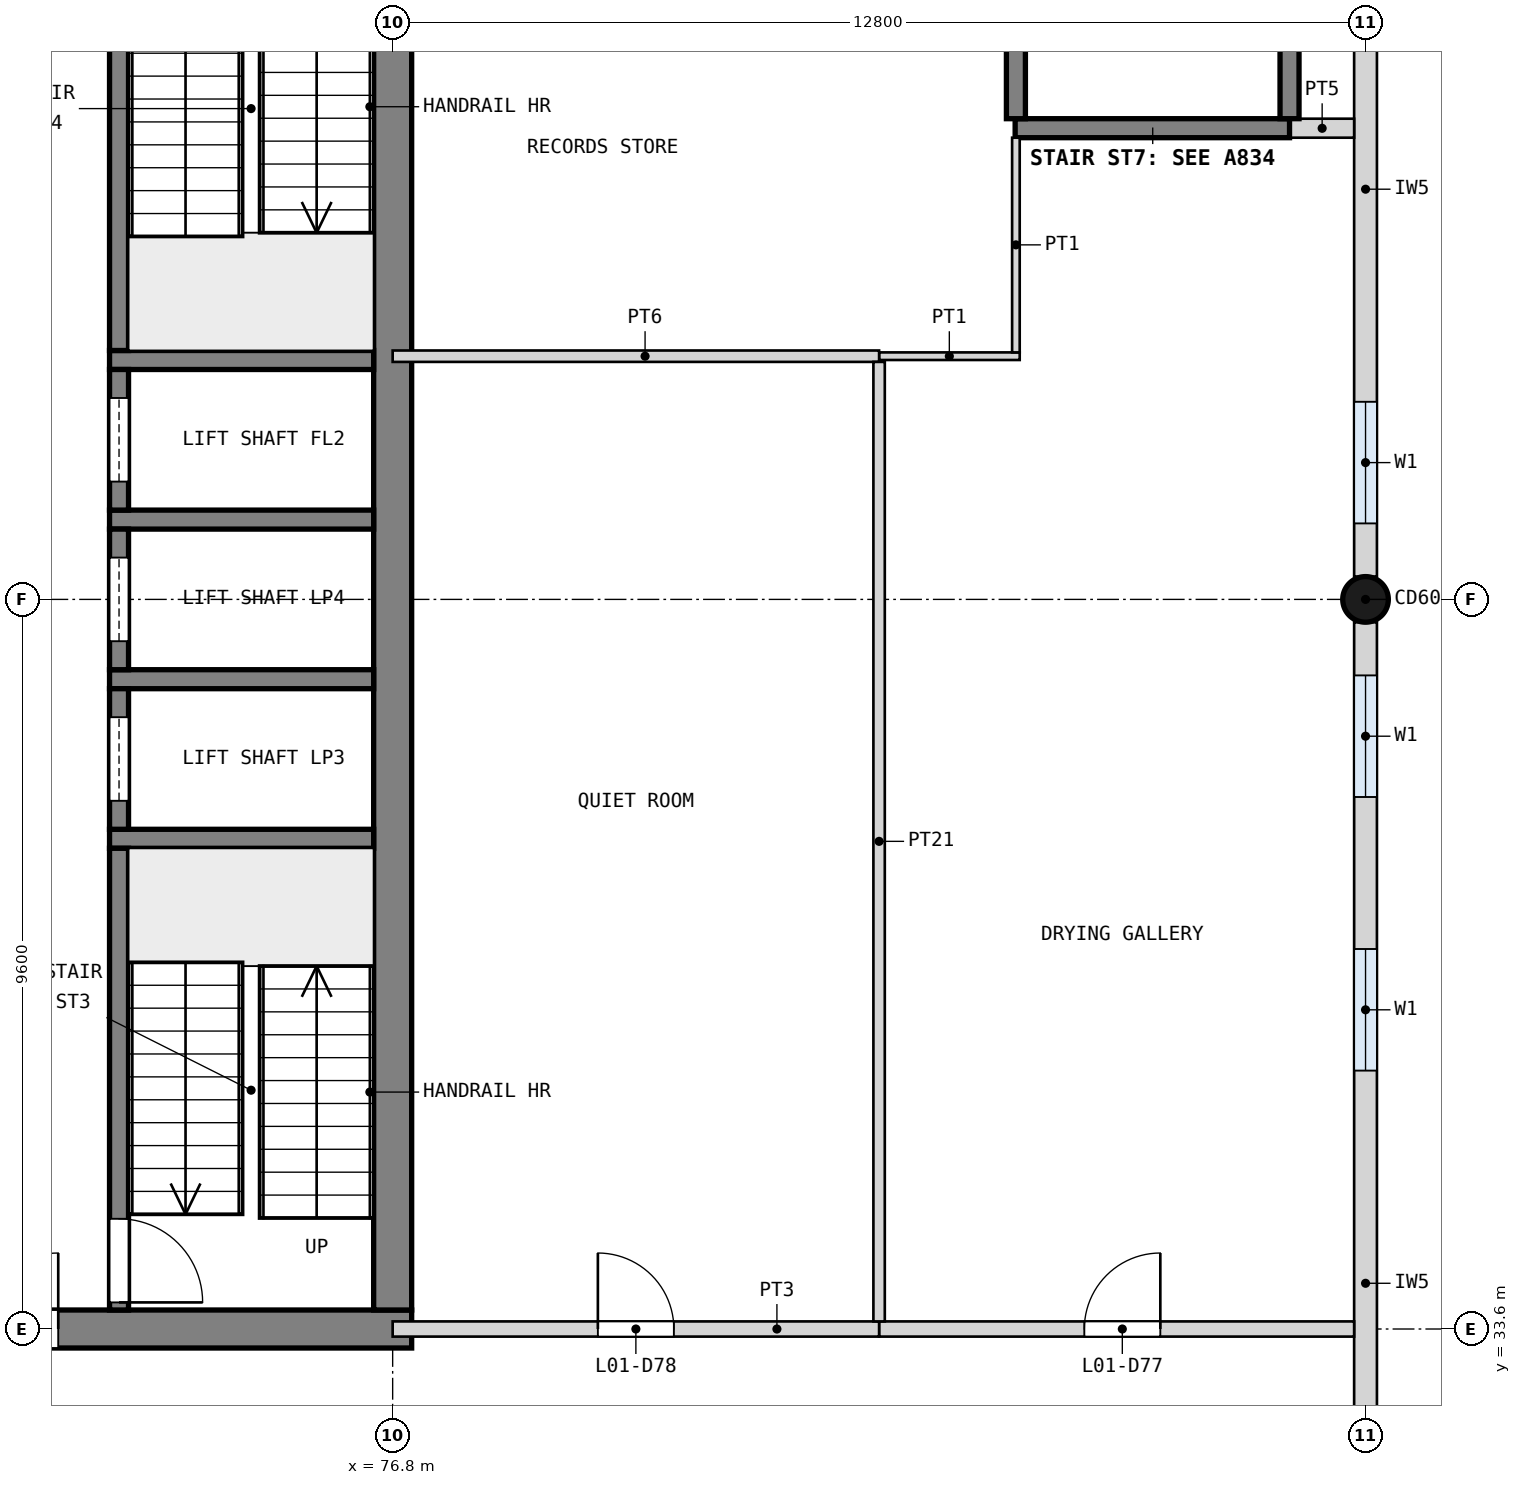
"""IFC4 building model, lengths in metres.
Left out: names, types, materials, properties, quantities, classifications, styles, units other than length and angle.
Written with IfcOpenShell. Run it as: python <this file> out.ifc"""

import sys

from ifc_helpers import new_model, si_unit, direction, frame, frame_2d, origin, origin_2d, place, context, subcontext, project, spatial, rectangle, circle, extrude, element, fill, save


model = new_model("IFC4")
c1 = context("Model", 3, precision=1e-05, world=origin(), true_north=direction((0.0, 1.0)))
c2 = subcontext(c1, "Body", "Model", "MODEL_VIEW")
j1 = project(units=[si_unit("LENGTHUNIT", "METRE"), si_unit("PLANEANGLEUNIT", "RADIAN")], contexts=[c1])
p1 = place(None, origin())
s1 = spatial("IfcSite", under=j1, at=p1, CompositionType="ELEMENT")
p2 = place(p1, origin())
s2 = spatial("IfcBuilding", under=s1, at=p2, CompositionType="ELEMENT")
p3 = place(p2, frame((0.0, 0.0, 4.2)))
s3 = spatial("IfcBuildingStorey", under=s2, at=p3, CompositionType="ELEMENT", Elevation=4.2)
p4 = place(p3, frame((63.75, 33.6, 0.0), z_axis=(0.0, 0.0, 1.0), x_axis=(1.0, 0.0, 0.0)))
e1 = element("IfcWall", 1, at=p4, inside=s3, PredefinedType="SHEAR", context=c2, shape_type="SweptSolid", body=[
    extrude(rectangle(XDim=13.3, YDim=0.5, at=frame_2d((6.65, 0.0))), origin(), (0.0, 0.0, 1.0), 4.2),
])
p5 = place(p4, frame((6.65, 0.0, 0.0)))
e2 = element("IfcOpeningElement", 2, at=p5, cuts=e1, PredefinedType="OPENING", context=c2, shape_type="SweptSolid", body=[
    extrude(rectangle(XDim=2.0, YDim=2.1, at=frame_2d((1.0, 1.05))), frame((0.0, 0.26, 0.0), z_axis=(0.0, -1.0, 0.0), x_axis=(1.0, 0.0, 0.0)), (0.0, 0.0, 1.0), 0.52),
])
p6 = place(p3, frame((76.8, 33.85, 0.0), z_axis=(0.0, 0.0, 1.0), x_axis=(0.0, 1.0, 0.0)))
e3 = element("IfcWall", 3, at=p6, inside=s3, PredefinedType="SHEAR", context=c2, shape_type="SweptSolid", body=[
    extrude(rectangle(XDim=18.7, YDim=0.5, at=frame_2d((9.35, 0.0))), origin(), (0.0, 0.0, 1.0), 4.2),
])
p7 = place(p3, frame((89.6, 43.2, 0.0), z_axis=(0.0, 0.0, 1.0), x_axis=(1.0, 0.0, 0.0)))
e4 = element("IfcColumn", 4, at=p7, inside=s3, PredefinedType="COLUMN", context=c2, shape_type="SweptSolid", body=[
    extrude(circle(Radius=0.3, at=origin_2d()), origin(), (0.0, 0.0, 1.0), 4.2),
])
p8 = place(p3, frame((89.6, 29.1, 0.0), z_axis=(0.0, 0.0, 1.0), x_axis=(0.0, 1.0, 0.0)))
e5 = element("IfcWall", 5, at=p8, inside=s3, PredefinedType="SOLIDWALL", context=c2, shape_type="SweptSolid", body=[
    extrude(rectangle(XDim=13.8, YDim=0.3, at=frame_2d((6.9, 0.0))), origin(), (0.0, 0.0, 1.0), 2.9),
])
p9 = place(p8, frame((0.7, 0.0, 1.0)))
e6 = element("IfcOpeningElement", 6, at=p9, cuts=e5, PredefinedType="OPENING", context=c2, shape_type="SweptSolid", body=[
    extrude(rectangle(XDim=1.6, YDim=1.8, at=frame_2d((0.8, 0.9))), frame((0.0, 0.16, 0.0), z_axis=(0.0, -1.0, 0.0), x_axis=(1.0, 0.0, 0.0)), (0.0, 0.0, 1.0), 0.32),
])
p10 = place(p8, frame((7.9, 0.0, 1.0)))
e7 = element("IfcOpeningElement", 7, at=p10, cuts=e5, PredefinedType="OPENING", context=c2, shape_type="SweptSolid", body=[
    extrude(rectangle(XDim=1.6, YDim=1.8, at=frame_2d((0.8, 0.9))), frame((0.0, 0.16, 0.0), z_axis=(0.0, -1.0, 0.0), x_axis=(1.0, 0.0, 0.0)), (0.0, 0.0, 1.0), 0.32),
])
p11 = place(p8, frame((11.5, 0.0, 1.0)))
e8 = element("IfcOpeningElement", 8, at=p11, cuts=e5, PredefinedType="OPENING", context=c2, shape_type="SweptSolid", body=[
    extrude(rectangle(XDim=1.6, YDim=1.8, at=frame_2d((0.8, 0.9))), frame((0.0, 0.16, 0.0), z_axis=(0.0, -1.0, 0.0), x_axis=(1.0, 0.0, 0.0)), (0.0, 0.0, 1.0), 0.32),
])
p12 = place(p3, frame((89.6, 43.5, 0.0), z_axis=(0.0, 0.0, 1.0), x_axis=(0.0, 1.0, 0.0)))
e9 = element("IfcWall", 9, at=p12, inside=s3, PredefinedType="SOLIDWALL", context=c2, shape_type="SweptSolid", body=[
    extrude(rectangle(XDim=13.8, YDim=0.3, at=frame_2d((6.9, 0.0))), origin(), (0.0, 0.0, 1.0), 2.9),
])
p13 = place(p12, frame((0.7, 0.0, 1.0)))
e10 = element("IfcOpeningElement", 10, at=p13, cuts=e9, PredefinedType="OPENING", context=c2, shape_type="SweptSolid", body=[
    extrude(rectangle(XDim=1.6, YDim=1.8, at=frame_2d((0.8, 0.9))), frame((0.0, 0.16, 0.0), z_axis=(0.0, -1.0, 0.0), x_axis=(1.0, 0.0, 0.0)), (0.0, 0.0, 1.0), 0.32),
])
p14 = place(p12, frame((7.9, 0.0, 1.0)))
e11 = element("IfcOpeningElement", 11, at=p14, cuts=e9, PredefinedType="OPENING", context=c2, shape_type="SweptSolid", body=[
    extrude(rectangle(XDim=1.6, YDim=1.8, at=frame_2d((0.8, 0.9))), frame((0.0, 0.16, 0.0), z_axis=(0.0, -1.0, 0.0), x_axis=(1.0, 0.0, 0.0)), (0.0, 0.0, 1.0), 0.32),
])
p15 = place(p12, frame((11.5, 0.0, 1.0)))
e12 = element("IfcOpeningElement", 12, at=p15, cuts=e9, PredefinedType="OPENING", context=c2, shape_type="SweptSolid", body=[
    extrude(rectangle(XDim=1.6, YDim=1.8, at=frame_2d((0.8, 0.9))), frame((0.0, 0.16, 0.0), z_axis=(0.0, -1.0, 0.0), x_axis=(1.0, 0.0, 0.0)), (0.0, 0.0, 1.0), 0.32),
])
for number, where, z_axis, x_axis in (
    (13, (76.55, 40.05, 0.0), (0.0, 0.0, 1.0), (-1.0, 0.0, 0.0)),
    (14, (76.55, 42.15, 0.0), (0.0, 0.0, 1.0), (-1.0, 0.0, 0.0)),
    (15, (76.55, 44.25, 0.0), (0.0, 0.0, 1.0), (-1.0, 0.0, 0.0)),
    (16, (76.55, 46.35, 0.0), (0.0, 0.0, 1.0), (-1.0, 0.0, 0.0)),
):
    element("IfcWall", number, at=place(p3, frame(where, z_axis=z_axis, x_axis=x_axis)), inside=s3, PredefinedType="SOLIDWALL", context=c2, shape_type="SweptSolid", body=[
        extrude(rectangle(XDim=3.475, YDim=0.25, at=frame_2d((1.738, 0.0))), origin(), (0.0, 0.0, 1.0), 3.9),
    ])
p16 = place(p3, frame((73.2, 33.85, 0.0), z_axis=(0.0, 0.0, 1.0), x_axis=(0.0, 1.0, 0.0)))
e17 = element("IfcWall", 17, at=p16, inside=s3, PredefinedType="SOLIDWALL", context=c2, shape_type="SweptSolid", body=[
    extrude(rectangle(XDim=6.075, YDim=0.25, at=frame_2d((3.038, 0.0))), origin(), (0.0, 0.0, 1.0), 3.9),
])
p17 = place(p16, frame((0.1, 0.0, 0.0)))
e18 = element("IfcOpeningElement", 18, at=p17, cuts=e17, PredefinedType="OPENING", context=c2, shape_type="SweptSolid", body=[
    extrude(rectangle(XDim=1.1, YDim=2.1, at=frame_2d((0.55, 1.05))), frame((0.0, 0.135, 0.0), z_axis=(0.0, -1.0, 0.0), x_axis=(1.0, 0.0, 0.0)), (0.0, 0.0, 1.0), 0.27),
])
p18 = place(p3, frame((73.2, 40.175, 0.0), z_axis=(0.0, 0.0, 1.0), x_axis=(0.0, 1.0, 0.0)))
e19 = element("IfcWall", 19, at=p18, inside=s3, PredefinedType="SOLIDWALL", context=c2, shape_type="SweptSolid", body=[
    extrude(rectangle(XDim=1.85, YDim=0.25, at=frame_2d((0.925, 0.0))), origin(), (0.0, 0.0, 1.0), 3.9),
])
p19 = place(p18, frame((0.375, 0.0, 0.0)))
e20 = element("IfcOpeningElement", 20, at=p19, cuts=e19, PredefinedType="OPENING", context=c2, shape_type="SweptSolid", body=[
    extrude(rectangle(XDim=1.1, YDim=2.1, at=frame_2d((0.55, 1.05))), frame((0.0, 0.135, 0.0), z_axis=(0.0, -1.0, 0.0), x_axis=(1.0, 0.0, 0.0)), (0.0, 0.0, 1.0), 0.27),
])
p20 = place(p3, frame((73.2, 42.275, 0.0), z_axis=(0.0, 0.0, 1.0), x_axis=(0.0, 1.0, 0.0)))
e21 = element("IfcWall", 21, at=p20, inside=s3, PredefinedType="SOLIDWALL", context=c2, shape_type="SweptSolid", body=[
    extrude(rectangle(XDim=1.85, YDim=0.25, at=frame_2d((0.925, 0.0))), origin(), (0.0, 0.0, 1.0), 3.9),
])
p21 = place(p20, frame((0.375, 0.0, 0.0)))
e22 = element("IfcOpeningElement", 22, at=p21, cuts=e21, PredefinedType="OPENING", context=c2, shape_type="SweptSolid", body=[
    extrude(rectangle(XDim=1.1, YDim=2.1, at=frame_2d((0.55, 1.05))), frame((0.0, 0.135, 0.0), z_axis=(0.0, -1.0, 0.0), x_axis=(1.0, 0.0, 0.0)), (0.0, 0.0, 1.0), 0.27),
])
p22 = place(p3, frame((73.2, 44.375, 0.0), z_axis=(0.0, 0.0, 1.0), x_axis=(0.0, 1.0, 0.0)))
e23 = element("IfcWall", 23, at=p22, inside=s3, PredefinedType="SOLIDWALL", context=c2, shape_type="SweptSolid", body=[
    extrude(rectangle(XDim=1.85, YDim=0.25, at=frame_2d((0.925, 0.0))), origin(), (0.0, 0.0, 1.0), 3.9),
])
p23 = place(p22, frame((0.375, 0.0, 0.0)))
e24 = element("IfcOpeningElement", 24, at=p23, cuts=e23, PredefinedType="OPENING", context=c2, shape_type="SweptSolid", body=[
    extrude(rectangle(XDim=1.1, YDim=2.1, at=frame_2d((0.55, 1.05))), frame((0.0, 0.135, 0.0), z_axis=(0.0, -1.0, 0.0), x_axis=(1.0, 0.0, 0.0)), (0.0, 0.0, 1.0), 0.27),
])
p24 = place(p3, frame((73.2, 46.475, 0.0), z_axis=(0.0, 0.0, 1.0), x_axis=(0.0, 1.0, 0.0)))
e25 = element("IfcWall", 25, at=p24, inside=s3, PredefinedType="SOLIDWALL", context=c2, shape_type="SweptSolid", body=[
    extrude(rectangle(XDim=6.075, YDim=0.25, at=frame_2d((3.038, 0.0))), origin(), (0.0, 0.0, 1.0), 3.9),
])
p25 = place(p24, frame((4.875, 0.0, 0.0)))
e26 = element("IfcOpeningElement", 26, at=p25, cuts=e25, PredefinedType="OPENING", context=c2, shape_type="SweptSolid", body=[
    extrude(rectangle(XDim=1.1, YDim=2.1, at=frame_2d((0.55, 1.05))), frame((0.0, 0.135, 0.0), z_axis=(0.0, -1.0, 0.0), x_axis=(1.0, 0.0, 0.0)), (0.0, 0.0, 1.0), 0.27),
])
p26 = place(p3, frame((89.45, 33.6, 0.0), z_axis=(0.0, 0.0, 1.0), x_axis=(-1.0, 0.0, 0.0)))
e27 = element("IfcWall", 27, at=p26, inside=s3, PredefinedType="PARTITIONING", context=c2, shape_type="SweptSolid", body=[
    extrude(rectangle(XDim=6.25, YDim=0.2, at=frame_2d((3.125, 0.0))), origin(), (0.0, 0.0, 1.0), 3.9),
])
p27 = place(p26, frame((2.55, 0.0, 0.0)))
e28 = element("IfcOpeningElement", 28, at=p27, cuts=e27, PredefinedType="OPENING", context=c2, shape_type="SweptSolid", body=[
    extrude(rectangle(XDim=1.0, YDim=2.1, at=frame_2d((0.5, 1.05))), frame((0.0, 0.11, 0.0), z_axis=(0.0, -1.0, 0.0), x_axis=(1.0, 0.0, 0.0)), (0.0, 0.0, 1.0), 0.22),
])
p28 = place(p3, frame((83.2, 33.6, 0.0), z_axis=(0.0, 0.0, 1.0), x_axis=(-1.0, 0.0, 0.0)))
e29 = element("IfcWall", 29, at=p28, inside=s3, PredefinedType="PARTITIONING", context=c2, shape_type="SweptSolid", body=[
    extrude(rectangle(XDim=6.4, YDim=0.2, at=frame_2d((3.2, 0.0))), origin(), (0.0, 0.0, 1.0), 3.9),
])
p29 = place(p28, frame((2.7, 0.0, 0.0)))
e30 = element("IfcOpeningElement", 30, at=p29, cuts=e29, PredefinedType="OPENING", context=c2, shape_type="SweptSolid", body=[
    extrude(rectangle(XDim=1.0, YDim=2.1, at=frame_2d((0.5, 1.05))), frame((0.0, 0.11, 0.0), z_axis=(0.0, -1.0, 0.0), x_axis=(1.0, 0.0, 0.0)), (0.0, 0.0, 1.0), 0.22),
])
p30 = place(p3, frame((85.05, 46.4, 0.0), z_axis=(0.0, 0.0, 1.0), x_axis=(-1.0, 0.0, 0.0)))
e31 = element("IfcWall", 31, at=p30, inside=s3, PredefinedType="PARTITIONING", context=c2, shape_type="SweptSolid", body=[
    extrude(rectangle(XDim=1.85, YDim=0.1, at=frame_2d((0.925, 0.0))), origin(), (0.0, 0.0, 1.0), 3.9),
])
p31 = place(p3, frame((83.2, 46.4, 0.0), z_axis=(0.0, 0.0, 1.0), x_axis=(-1.0, 0.0, 0.0)))
e32 = element("IfcWall", 32, at=p31, inside=s3, PredefinedType="PARTITIONING", context=c2, shape_type="SweptSolid", body=[
    extrude(rectangle(XDim=6.4, YDim=0.15, at=frame_2d((3.2, 0.0))), origin(), (0.0, 0.0, 1.0), 3.9),
])
p32 = place(p3, frame((89.45, 49.4, 0.0), z_axis=(0.0, 0.0, 1.0), x_axis=(-1.0, 0.0, 0.0)))
e33 = element("IfcWall", 33, at=p32, inside=s3, PredefinedType="PARTITIONING", context=c2, shape_type="SweptSolid", body=[
    extrude(rectangle(XDim=0.85, YDim=0.25, at=frame_2d((0.425, 0.0))), origin(), (0.0, 0.0, 1.0), 3.9),
])
p33 = place(p3, frame((88.6, 49.4, 0.0), z_axis=(0.0, 0.0, 1.0), x_axis=(-1.0, 0.0, 0.0)))
e34 = element("IfcWall", 34, at=p33, inside=s3, PredefinedType="SHEAR", context=c2, shape_type="SweptSolid", body=[
    extrude(rectangle(XDim=3.61, YDim=0.25, at=frame_2d((1.805, 0.0))), origin(), (0.0, 0.0, 1.0), 3.9),
])
p34 = place(p3, frame((88.6, 49.525, 0.0), z_axis=(0.0, 0.0, 1.0), x_axis=(0.0, 1.0, 0.0)))
e35 = element("IfcWall", 35, at=p34, inside=s3, PredefinedType="SHEAR", context=c2, shape_type="SweptSolid", body=[
    extrude(rectangle(XDim=5.75, YDim=0.25, at=frame_2d((2.875, 0.0))), origin(), (0.0, 0.0, 1.0), 3.9),
])
p35 = place(p3, frame((85.0, 46.45, 0.0), z_axis=(0.0, 0.0, 1.0), x_axis=(0.0, 1.0, 0.0)))
e36 = element("IfcWall", 36, at=p35, inside=s3, PredefinedType="PARTITIONING", context=c2, shape_type="SweptSolid", body=[
    extrude(rectangle(XDim=2.825, YDim=0.1, at=frame_2d((1.413, 0.0))), origin(), (0.0, 0.0, 1.0), 3.9),
])
p36 = place(p3, frame((85.0, 49.525, 0.0), z_axis=(0.0, 0.0, 1.0), x_axis=(0.0, 1.0, 0.0)))
e37 = element("IfcWall", 37, at=p36, inside=s3, PredefinedType="SHEAR", context=c2, shape_type="SweptSolid", body=[
    extrude(rectangle(XDim=3.175, YDim=0.25, at=frame_2d((1.587, 0.0))), origin(), (0.0, 0.0, 1.0), 3.9),
])
p37 = place(p3, frame((83.2, 33.7, 0.0), z_axis=(0.0, 0.0, 1.0), x_axis=(0.0, 1.0, 0.0)))
e38 = element("IfcWall", 38, at=p37, inside=s3, PredefinedType="PARTITIONING", context=c2, shape_type="SweptSolid", body=[
    extrude(rectangle(XDim=12.625, YDim=0.15, at=frame_2d((6.312, 0.0))), origin(), (0.0, 0.0, 1.0), 2.9),
])
p38 = place(p17, frame((1.1, 0.0, 0.0), z_axis=(0.0, 0.0, 1.0), x_axis=(-1.0, 0.0, 0.0)))
e39 = element("IfcDoor", 39, at=p38, inside=s3, OperationType="SINGLE_SWING_RIGHT", PredefinedType="DOOR", context=c2, shape_type="SweptSolid", body=[
    extrude(rectangle(XDim=1.1, YDim=2.1, at=frame_2d((0.55, 1.05))), frame((0.0, 0.025, 0.0), z_axis=(0.0, -1.0, 0.0), x_axis=(1.0, 0.0, 0.0)), (0.0, 0.0, 1.0), 0.05),
])
fill(e18, e39)
p39 = place(p19, origin())
e40 = element("IfcDoor", 40, at=p39, inside=s3, OperationType="SLIDING_TO_LEFT", PredefinedType="DOOR", context=c2, shape_type="SweptSolid", body=[
    extrude(rectangle(XDim=1.1, YDim=2.1, at=frame_2d((0.55, 1.05))), frame((0.0, 0.025, 0.0), z_axis=(0.0, -1.0, 0.0), x_axis=(1.0, 0.0, 0.0)), (0.0, 0.0, 1.0), 0.05),
])
fill(e20, e40)
p40 = place(p21, origin())
e41 = element("IfcDoor", 41, at=p40, inside=s3, OperationType="SLIDING_TO_LEFT", PredefinedType="DOOR", context=c2, shape_type="SweptSolid", body=[
    extrude(rectangle(XDim=1.1, YDim=2.1, at=frame_2d((0.55, 1.05))), frame((0.0, 0.025, 0.0), z_axis=(0.0, -1.0, 0.0), x_axis=(1.0, 0.0, 0.0)), (0.0, 0.0, 1.0), 0.05),
])
fill(e22, e41)
p41 = place(p23, origin())
e42 = element("IfcDoor", 42, at=p41, inside=s3, OperationType="SLIDING_TO_LEFT", PredefinedType="DOOR", context=c2, shape_type="SweptSolid", body=[
    extrude(rectangle(XDim=1.1, YDim=2.1, at=frame_2d((0.55, 1.05))), frame((0.0, 0.025, 0.0), z_axis=(0.0, -1.0, 0.0), x_axis=(1.0, 0.0, 0.0)), (0.0, 0.0, 1.0), 0.05),
])
fill(e24, e42)
p42 = place(p5, origin())
e43 = element("IfcDoor", 43, at=p42, inside=s3, OperationType="DOUBLE_DOOR_SINGLE_SWING", PredefinedType="DOOR", context=c2, shape_type="SweptSolid", body=[
    extrude(rectangle(XDim=2.0, YDim=2.1, at=frame_2d((1.0, 1.05))), frame((0.0, 0.025, 0.0), z_axis=(0.0, -1.0, 0.0), x_axis=(1.0, 0.0, 0.0)), (0.0, 0.0, 1.0), 0.05),
])
fill(e2, e43)
p43 = place(p27, frame((1.0, 0.0, 0.0), z_axis=(0.0, 0.0, 1.0), x_axis=(-1.0, 0.0, 0.0)))
e44 = element("IfcDoor", 44, at=p43, inside=s3, OperationType="SINGLE_SWING_RIGHT", PredefinedType="DOOR", context=c2, shape_type="SweptSolid", body=[
    extrude(rectangle(XDim=1.0, YDim=2.1, at=frame_2d((0.5, 1.05))), frame((0.0, 0.025, 0.0), z_axis=(0.0, -1.0, 0.0), x_axis=(1.0, 0.0, 0.0)), (0.0, 0.0, 1.0), 0.05),
])
fill(e28, e44)
p44 = place(p29, frame((1.0, 0.0, 0.0), z_axis=(0.0, 0.0, 1.0), x_axis=(-1.0, 0.0, 0.0)))
e45 = element("IfcDoor", 45, at=p44, inside=s3, OperationType="SINGLE_SWING_LEFT", PredefinedType="DOOR", context=c2, shape_type="SweptSolid", body=[
    extrude(rectangle(XDim=1.0, YDim=2.1, at=frame_2d((0.5, 1.05))), frame((0.0, 0.025, 0.0), z_axis=(0.0, -1.0, 0.0), x_axis=(1.0, 0.0, 0.0)), (0.0, 0.0, 1.0), 0.05),
])
fill(e30, e45)
p45 = place(p10, origin())
e46 = element("IfcWindow", 46, at=p45, inside=s3, PartitioningType="SINGLE_PANEL", PredefinedType="WINDOW", context=c2, shape_type="SweptSolid", body=[
    extrude(rectangle(XDim=1.6, YDim=1.8, at=frame_2d((0.8, 0.9))), frame((0.0, 0.03, 0.0), z_axis=(0.0, -1.0, 0.0), x_axis=(1.0, 0.0, 0.0)), (0.0, 0.0, 1.0), 0.06),
])
fill(e7, e46)
p46 = place(p11, origin())
e47 = element("IfcWindow", 47, at=p46, inside=s3, PartitioningType="SINGLE_PANEL", PredefinedType="WINDOW", context=c2, shape_type="SweptSolid", body=[
    extrude(rectangle(XDim=1.6, YDim=1.8, at=frame_2d((0.8, 0.9))), frame((0.0, 0.03, 0.0), z_axis=(0.0, -1.0, 0.0), x_axis=(1.0, 0.0, 0.0)), (0.0, 0.0, 1.0), 0.06),
])
fill(e8, e47)
p47 = place(p13, origin())
e48 = element("IfcWindow", 48, at=p47, inside=s3, PartitioningType="SINGLE_PANEL", PredefinedType="WINDOW", context=c2, shape_type="SweptSolid", body=[
    extrude(rectangle(XDim=1.6, YDim=1.8, at=frame_2d((0.8, 0.9))), frame((0.0, 0.03, 0.0), z_axis=(0.0, -1.0, 0.0), x_axis=(1.0, 0.0, 0.0)), (0.0, 0.0, 1.0), 0.06),
])
fill(e10, e48)
save(model, sys.argv[1])
